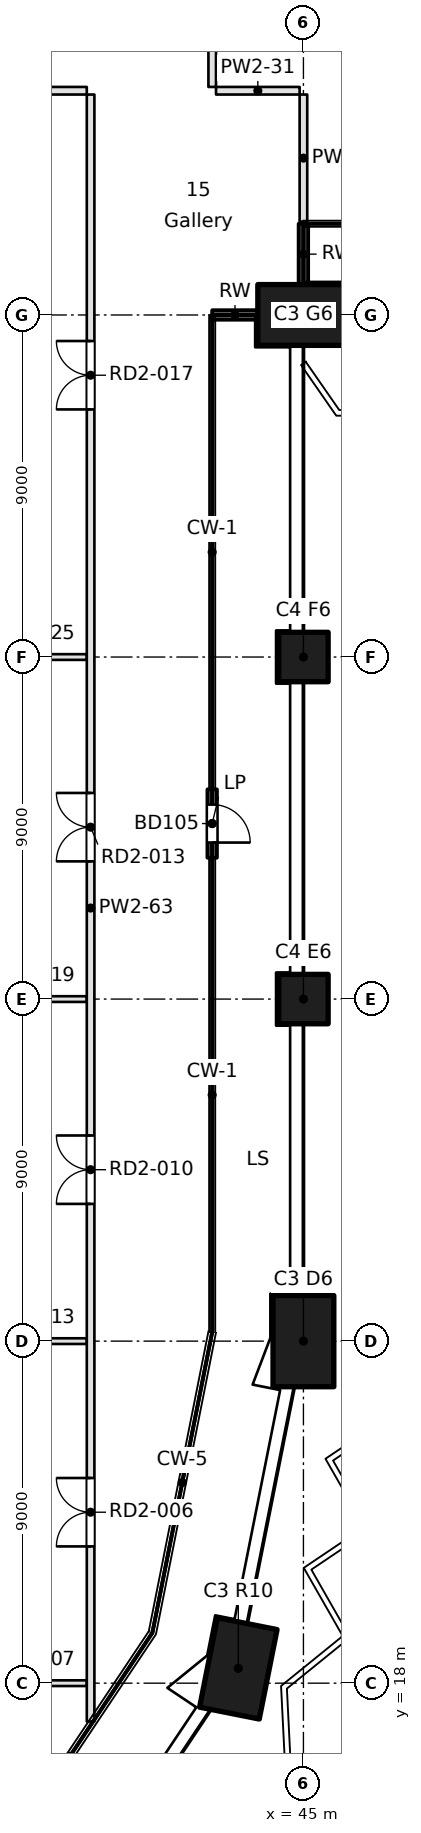
"""IFC4 building model, lengths in metres.
Left out: names, types, materials, properties, quantities, classifications, styles, units other than length and angle.
Written with IfcOpenShell. Run it as: python <this file> out.ifc"""

import sys

from ifc_helpers import new_model, si_unit, direction, frame, frame_2d, origin, origin_2d, place, context, subcontext, project, spatial, rectangle, extrude, element, fill, save


model = new_model("IFC4")
c1 = context("Model", 3, precision=1e-05, world=origin(), true_north=direction((0.0, 1.0)))
c2 = subcontext(c1, "Body", "Model", "MODEL_VIEW")
j1 = project(units=[si_unit("LENGTHUNIT", "METRE"), si_unit("PLANEANGLEUNIT", "RADIAN")], contexts=[c1])
p1 = place(None, origin())
s1 = spatial("IfcSite", under=j1, at=p1, CompositionType="ELEMENT")
p2 = place(p1, origin())
s2 = spatial("IfcBuilding", under=s1, at=p2, CompositionType="ELEMENT")
p3 = place(p2, frame((0.0, 0.0, 76.5)))
s3 = spatial("IfcBuildingStorey", under=s2, at=p3, CompositionType="ELEMENT", Elevation=76.5)
for number, where, z_axis, x_axis in (
    (1, (43.287, 18.39, 0.0), (0.0, 0.0, 1.0), (0.195, 0.981, 0.0)),
    (2, (45.0, 27.0, 0.0), (0.0, 0.0, 1.0), (0.0, 1.0, 0.0)),
):
    element("IfcColumn", number, at=place(p3, frame(where, z_axis=z_axis, x_axis=x_axis)), inside=s3, PredefinedType="COLUMN", context=c2, shape_type="SweptSolid", body=[
        extrude(rectangle(XDim=2.4, YDim=1.6, at=origin_2d()), origin(), (0.0, 0.0, 1.0), 3.7),
    ])
for number, where, z_axis, x_axis in (
    (3, (45.0, 36.0, 0.0), (0.0, 0.0, 1.0), (1.0, 0.0, 0.0)),
    (4, (45.0, 45.0, 0.0), (0.0, 0.0, 1.0), (1.0, 0.0, 0.0)),
):
    element("IfcColumn", number, at=place(p3, frame(where, z_axis=z_axis, x_axis=x_axis)), inside=s3, PredefinedType="COLUMN", context=c2, shape_type="SweptSolid", body=[
        extrude(rectangle(XDim=1.3, YDim=1.3, at=origin_2d()), origin(), (0.0, 0.0, 1.0), 3.7),
    ])
p4 = place(p3, frame((45.0, 54.0, 0.0), z_axis=(0.0, 0.0, 1.0), x_axis=(1.0, 0.0, 0.0)))
e5 = element("IfcColumn", 5, at=p4, inside=s3, PredefinedType="COLUMN", context=c2, shape_type="SweptSolid", body=[
    extrude(rectangle(XDim=2.4, YDim=1.6, at=origin_2d()), origin(), (0.0, 0.0, 1.0), 3.7),
])
p5 = place(p3, frame((42.599, 39.718, 0.0), z_axis=(0.0, 0.0, 1.0), x_axis=(0.0, 1.0, 0.0)))
e6 = element("IfcWall", 6, at=p5, inside=s3, PredefinedType="SOLIDWALL", context=c2, shape_type="SweptSolid", body=[
    extrude(rectangle(XDim=1.8, YDim=0.25, at=frame_2d((0.9, 0.0))), origin(), (0.0, 0.0, 1.0), 3.25),
])
p6 = place(p5, frame((0.4, 0.0, 0.0)))
e7 = element("IfcOpeningElement", 7, at=p6, cuts=e6, PredefinedType="OPENING", context=c2, shape_type="SweptSolid", body=[
    extrude(rectangle(XDim=1.0, YDim=2.1, at=frame_2d((0.5, 1.05))), frame((0.0, 0.125, 0.0), z_axis=(0.0, -1.0, 0.0), x_axis=(1.0, 0.0, 0.0)), (0.0, 0.0, 1.0), 0.25),
])
p7 = place(p3, frame((42.599, 54.0, 0.0), z_axis=(0.0, 0.0, 1.0), x_axis=(0.999999917344, 0.000406586671, 0.0)))
e8 = element("IfcWall", 8, at=p7, inside=s3, PredefinedType="SOLIDWALL", context=c2, shape_type="SweptSolid", body=[
    extrude(rectangle(XDim=1.201, YDim=0.25, at=frame_2d((0.601, 0.0))), origin(), (0.0, 0.0, 1.0), 3.25),
])
p8 = place(p3, frame((44.999, 54.8, 0.0), z_axis=(0.0, 0.0, 1.0), x_axis=(0.000152508767, 0.999999988371, 0.0)))
e9 = element("IfcWall", 9, at=p8, inside=s3, PredefinedType="SOLIDWALL", context=c2, shape_type="SweptSolid", body=[
    extrude(rectangle(XDim=1.601, YDim=0.25, at=frame_2d((0.8, 0.0))), origin(), (0.0, 0.0, 1.0), 3.25),
])
for number, where, z_axis, x_axis in (
    (10, (36.7, 18.0, 0.0), (0.0, 0.0, 1.0), (1.0, 0.0, 0.0)),
    (11, (36.7, 27.0, 0.0), (0.0, 0.0, 1.0), (1.0, 0.0, 0.0)),
    (12, (36.7, 36.0, 0.0), (0.0, 0.0, 1.0), (1.0, 0.0, 0.0)),
    (13, (36.7, 45.0, 0.0), (0.0, 0.0, 1.0), (1.0, 0.0, 0.0)),
):
    element("IfcWall", number, at=place(p3, frame(where, z_axis=z_axis, x_axis=x_axis)), inside=s3, PredefinedType="PARTITIONING", context=c2, shape_type="SweptSolid", body=[
        extrude(rectangle(XDim=2.6, YDim=0.15, at=frame_2d((1.3, 0.0))), origin(), (0.0, 0.0, 1.0), 3.25),
    ])
p9 = place(p3, frame((39.3, 59.9, 0.0), z_axis=(0.0, 0.0, 1.0), x_axis=(-1.0, 0.0, 0.0)))
e14 = element("IfcWall", 14, at=p9, inside=s3, PredefinedType="PARTITIONING", context=c2, shape_type="SweptSolid", body=[
    extrude(rectangle(XDim=11.8, YDim=0.2, at=frame_2d((5.9, 0.0))), origin(), (0.0, 0.0, 1.0), 3.25),
])
p10 = place(p3, frame((42.7, 59.9, 0.0), z_axis=(0.0, 0.0, 1.0), x_axis=(1.0, 0.0, 0.0)))
e15 = element("IfcWall", 15, at=p10, inside=s3, PredefinedType="PARTITIONING", context=c2, shape_type="SweptSolid", body=[
    extrude(rectangle(XDim=2.2, YDim=0.2, at=frame_2d((1.1, 0.0))), origin(), (0.0, 0.0, 1.0), 3.25),
])
p11 = place(p3, frame((39.4, 16.991, 0.0), z_axis=(0.0, 0.0, 1.0), x_axis=(0.0, 1.0, 0.0)))
e16 = element("IfcWall", 16, at=p11, inside=s3, PredefinedType="PARTITIONING", context=c2, shape_type="SweptSolid", body=[
    extrude(rectangle(XDim=42.809, YDim=0.2, at=frame_2d((21.405, 0.0))), origin(), (0.0, 0.0, 1.0), 3.25),
])
p12 = place(p11, frame((4.608, 0.0, 0.0)))
e17 = element("IfcOpeningElement", 17, at=p12, cuts=e16, PredefinedType="OPENING", context=c2, shape_type="SweptSolid", body=[
    extrude(rectangle(XDim=1.8, YDim=2.1, at=frame_2d((0.9, 1.05))), frame((0.0, 0.1, 0.0), z_axis=(0.0, -1.0, 0.0), x_axis=(1.0, 0.0, 0.0)), (0.0, 0.0, 1.0), 0.2),
])
p13 = place(p11, frame((13.62, 0.0, 0.0)))
e18 = element("IfcOpeningElement", 18, at=p13, cuts=e16, PredefinedType="OPENING", context=c2, shape_type="SweptSolid", body=[
    extrude(rectangle(XDim=1.8, YDim=2.1, at=frame_2d((0.9, 1.05))), frame((0.0, 0.1, 0.0), z_axis=(0.0, -1.0, 0.0), x_axis=(1.0, 0.0, 0.0)), (0.0, 0.0, 1.0), 0.2),
])
p14 = place(p11, frame((22.633, 0.0, 0.0)))
e19 = element("IfcOpeningElement", 19, at=p14, cuts=e16, PredefinedType="OPENING", context=c2, shape_type="SweptSolid", body=[
    extrude(rectangle(XDim=1.8, YDim=2.1, at=frame_2d((0.9, 1.05))), frame((0.0, 0.1, 0.0), z_axis=(0.0, -1.0, 0.0), x_axis=(1.0, 0.0, 0.0)), (0.0, 0.0, 1.0), 0.2),
])
p15 = place(p11, frame((34.524, 0.0, 0.0)))
e20 = element("IfcOpeningElement", 20, at=p15, cuts=e16, PredefinedType="OPENING", context=c2, shape_type="SweptSolid", body=[
    extrude(rectangle(XDim=1.8, YDim=2.1, at=frame_2d((0.9, 1.05))), frame((0.0, 0.1, 0.0), z_axis=(0.0, -1.0, 0.0), x_axis=(1.0, 0.0, 0.0)), (0.0, 0.0, 1.0), 0.2),
])
p16 = place(p3, frame((42.6, 63.6, 0.0), z_axis=(0.0, 0.0, 1.0), x_axis=(0.0, -1.0, 0.0)))
e21 = element("IfcWall", 21, at=p16, inside=s3, PredefinedType="PARTITIONING", context=c2, shape_type="SweptSolid", body=[
    extrude(rectangle(XDim=3.6, YDim=0.2, at=frame_2d((1.8, 0.0))), origin(), (0.0, 0.0, 1.0), 3.25),
])
p17 = place(p3, frame((45.0, 59.8, 0.0), z_axis=(0.0, 0.0, 1.0), x_axis=(0.0, -1.0, 0.0)))
e22 = element("IfcWall", 22, at=p17, inside=s3, PredefinedType="PARTITIONING", context=c2, shape_type="SweptSolid", body=[
    extrude(rectangle(XDim=3.345, YDim=0.2, at=frame_2d((1.673, 0.0))), origin(), (0.0, 0.0, 1.0), 3.25),
])
p18 = place(p6, frame((1.0, 0.0, 0.0), z_axis=(0.0, 0.0, 1.0), x_axis=(-1.0, 0.0, 0.0)))
e23 = element("IfcDoor", 23, at=p18, inside=s3, OperationType="SINGLE_SWING_RIGHT", PredefinedType="DOOR", context=c2, shape_type="SweptSolid", body=[
    extrude(rectangle(XDim=1.0, YDim=2.1, at=frame_2d((0.5, 1.05))), frame((0.0, 0.025, 0.0), z_axis=(0.0, -1.0, 0.0), x_axis=(1.0, 0.0, 0.0)), (0.0, 0.0, 1.0), 0.05),
])
fill(e7, e23)
p19 = place(p12, origin())
e24 = element("IfcDoor", 24, at=p19, inside=s3, OperationType="DOUBLE_DOOR_SINGLE_SWING", PredefinedType="DOOR", context=c2, shape_type="SweptSolid", body=[
    extrude(rectangle(XDim=1.8, YDim=2.1, at=frame_2d((0.9, 1.05))), frame((0.0, 0.025, 0.0), z_axis=(0.0, -1.0, 0.0), x_axis=(1.0, 0.0, 0.0)), (0.0, 0.0, 1.0), 0.05),
])
fill(e17, e24)
p20 = place(p13, origin())
e25 = element("IfcDoor", 25, at=p20, inside=s3, OperationType="DOUBLE_DOOR_SINGLE_SWING", PredefinedType="DOOR", context=c2, shape_type="SweptSolid", body=[
    extrude(rectangle(XDim=1.8, YDim=2.1, at=frame_2d((0.9, 1.05))), frame((0.0, 0.025, 0.0), z_axis=(0.0, -1.0, 0.0), x_axis=(1.0, 0.0, 0.0)), (0.0, 0.0, 1.0), 0.05),
])
fill(e18, e25)
p21 = place(p14, origin())
e26 = element("IfcDoor", 26, at=p21, inside=s3, OperationType="DOUBLE_DOOR_SINGLE_SWING", PredefinedType="DOOR", context=c2, shape_type="SweptSolid", body=[
    extrude(rectangle(XDim=1.8, YDim=2.1, at=frame_2d((0.9, 1.05))), frame((0.0, 0.025, 0.0), z_axis=(0.0, -1.0, 0.0), x_axis=(1.0, 0.0, 0.0)), (0.0, 0.0, 1.0), 0.05),
])
fill(e19, e26)
p22 = place(p15, origin())
e27 = element("IfcDoor", 27, at=p22, inside=s3, OperationType="DOUBLE_DOOR_SINGLE_SWING", PredefinedType="DOOR", context=c2, shape_type="SweptSolid", body=[
    extrude(rectangle(XDim=1.8, YDim=2.1, at=frame_2d((0.9, 1.05))), frame((0.0, 0.025, 0.0), z_axis=(0.0, -1.0, 0.0), x_axis=(1.0, 0.0, 0.0)), (0.0, 0.0, 1.0), 0.05),
])
fill(e20, e27)
save(model, sys.argv[1])
